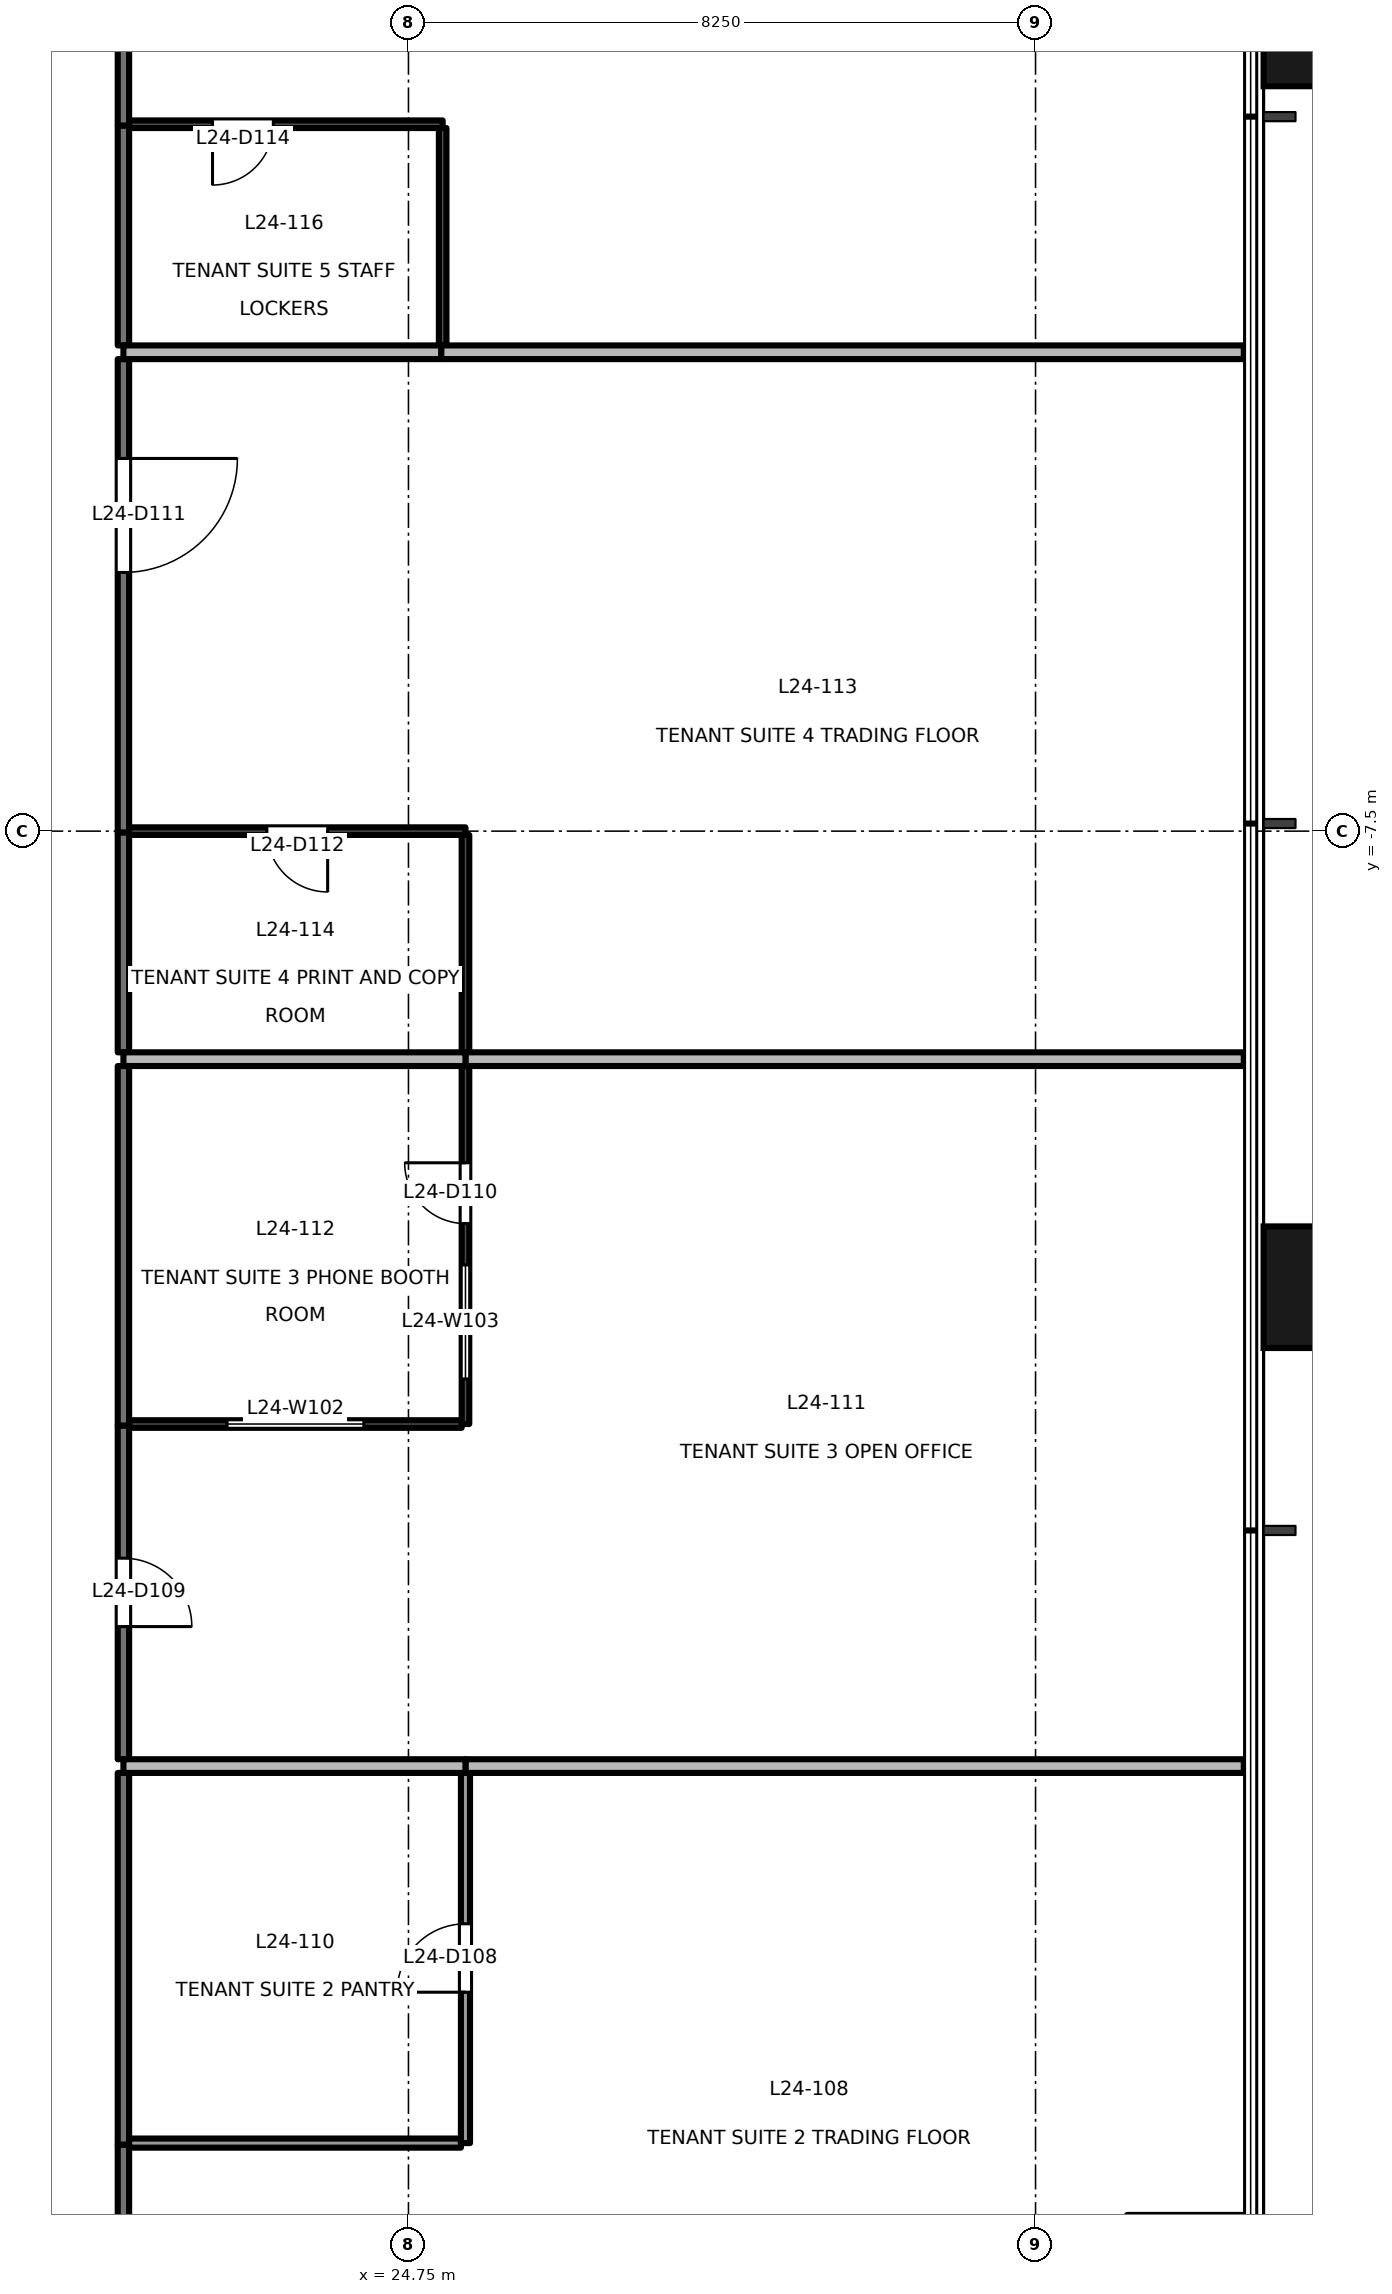
"""IFC4 building model, lengths in metres.
Left out: names, types, materials, properties, quantities, classifications, styles, units other than length and angle.
Written with IfcOpenShell. Run it as: python <this file> out.ifc"""

import sys

from ifc_helpers import new_model, si_unit, direction, frame, frame_2d, origin, origin_2d, place, context, subcontext, project, spatial, rectangle, extrude, element, fill, save


model = new_model("IFC4")
c1 = context("Model", 3, precision=1e-05, world=origin(), true_north=direction((0.0, 1.0)))
c2 = subcontext(c1, "Body", "Model", "MODEL_VIEW")
j1 = project(units=[si_unit("LENGTHUNIT", "METRE"), si_unit("PLANEANGLEUNIT", "RADIAN")], contexts=[c1])
p1 = place(None, origin())
s1 = spatial("IfcSite", under=j1, at=p1, CompositionType="ELEMENT")
p2 = place(p1, origin())
s2 = spatial("IfcBuilding", under=s1, at=p2, CompositionType="ELEMENT")
p3 = place(p2, frame((0.0, 0.0, 107.7)))
s3 = spatial("IfcBuildingStorey", under=s2, at=p3, CompositionType="ELEMENT", Elevation=107.7)
for number, where, z_axis, x_axis in (
    (1, (36.9, -13.5, -0.2), (0.0, 0.0, 1.0), (0.0, 1.0, 0.0)),
    (2, (36.9, 3.1, -0.2), (0.0, 0.0, 1.0), (0.0, 1.0, 0.0)),
):
    element("IfcColumn", number, at=place(p3, frame(where, z_axis=z_axis, x_axis=x_axis)), inside=s3, PredefinedType="COLUMN", context=c2, shape_type="SweptSolid", body=[
        extrude(rectangle(XDim=1.6, YDim=1.8, at=origin_2d()), origin(), (0.0, 0.0, 1.0), 4.0),
    ])
p4 = place(p3, frame((21.0, -24.78, 0.0), z_axis=(0.0, 0.0, 1.0), x_axis=(0.0, -1.0, 0.0)))
e3 = element("IfcWall", 3, at=p4, inside=s3, PredefinedType="PARTITIONING", context=c2, shape_type="SweptSolid", body=[
    extrude(rectangle(XDim=3.9, YDim=0.15, at=frame_2d((1.95, 0.0))), origin(), (0.0, 0.0, 1.0), 3.8),
])
p5 = place(p4, frame((1.675, 0.0, 0.0)))
e4 = element("IfcOpeningElement", 4, at=p5, cuts=e3, PredefinedType="OPENING", context=c2, shape_type="SweptSolid", body=[
    extrude(rectangle(XDim=1.5, YDim=2.1, at=frame_2d((0.75, 1.05))), frame((0.0, 0.085, 0.0), z_axis=(0.0, -1.0, 0.0), x_axis=(1.0, 0.0, 0.0)), (0.0, 0.0, 1.0), 0.171),
])
p6 = place(p3, frame((21.0, -19.89, 0.0), z_axis=(0.0, 0.0, 1.0), x_axis=(0.0, -1.0, 0.0)))
e5 = element("IfcWall", 5, at=p6, inside=s3, PredefinedType="PARTITIONING", context=c2, shape_type="SweptSolid", body=[
    extrude(rectangle(XDim=4.89, YDim=0.15, at=frame_2d((2.445, 0.0))), origin(), (0.0, 0.0, 1.0), 3.8),
])
p7 = place(p3, frame((21.0, -15.32, 0.0), z_axis=(0.0, 0.0, 1.0), x_axis=(0.0, -1.0, 0.0)))
e6 = element("IfcWall", 6, at=p7, inside=s3, PredefinedType="PARTITIONING", context=c2, shape_type="SweptSolid", body=[
    extrude(rectangle(XDim=4.39, YDim=0.15, at=frame_2d((2.195, 0.0))), origin(), (0.0, 0.0, 1.0), 3.8),
])
p8 = place(p7, frame((1.745, 0.0, 0.0)))
e7 = element("IfcOpeningElement", 7, at=p8, cuts=e6, PredefinedType="OPENING", context=c2, shape_type="SweptSolid", body=[
    extrude(rectangle(XDim=0.9, YDim=2.1, at=frame_2d((0.45, 1.05))), frame((0.0, 0.085, 0.0), z_axis=(0.0, -1.0, 0.0), x_axis=(1.0, 0.0, 0.0)), (0.0, 0.0, 1.0), 0.171),
])
p9 = place(p3, frame((21.0, -10.59, 0.0), z_axis=(0.0, 0.0, 1.0), x_axis=(0.0, -1.0, 0.0)))
e8 = element("IfcWall", 8, at=p9, inside=s3, PredefinedType="PARTITIONING", context=c2, shape_type="SweptSolid", body=[
    extrude(rectangle(XDim=4.73, YDim=0.15, at=frame_2d((2.365, 0.0))), origin(), (0.0, 0.0, 1.0), 2.9),
])
p10 = place(p3, frame((21.0, -1.29, 0.0), z_axis=(0.0, 0.0, 1.0), x_axis=(0.0, -1.0, 0.0)))
e9 = element("IfcWall", 9, at=p10, inside=s3, PredefinedType="PARTITIONING", context=c2, shape_type="SweptSolid", body=[
    extrude(rectangle(XDim=6.23, YDim=0.15, at=frame_2d((3.115, 0.0))), origin(), (0.0, 0.0, 1.0), 2.9),
])
p11 = place(p10, frame((1.307, 0.0, 0.0)))
e10 = element("IfcOpeningElement", 10, at=p11, cuts=e9, PredefinedType="OPENING", context=c2, shape_type="SweptSolid", body=[
    extrude(rectangle(XDim=1.5, YDim=2.1, at=frame_2d((0.75, 1.05))), frame((0.0, 0.085, 0.0), z_axis=(0.0, -1.0, 0.0), x_axis=(1.0, 0.0, 0.0)), (0.0, 0.0, 1.0), 0.171),
])
p12 = place(p3, frame((21.0, -7.52, 0.0), z_axis=(0.0, 0.0, 1.0), x_axis=(0.0, -1.0, 0.0)))
e11 = element("IfcWall", 11, at=p12, inside=s3, PredefinedType="PARTITIONING", context=c2, shape_type="SweptSolid", body=[
    extrude(rectangle(XDim=2.89, YDim=0.15, at=frame_2d((1.445, 0.0))), origin(), (0.0, 0.0, 1.0), 2.9),
])
p13 = place(p3, frame((21.0, 6.32, 0.0), z_axis=(0.0, 0.0, 1.0), x_axis=(0.0, -1.0, 0.0)))
e12 = element("IfcWall", 12, at=p13, inside=s3, PredefinedType="PARTITIONING", context=c2, shape_type="SweptSolid", body=[
    extrude(rectangle(XDim=4.54, YDim=0.15, at=frame_2d((2.27, 0.0))), origin(), (0.0, 0.0, 1.0), 2.9),
])
p14 = place(p13, frame((1.52, 0.0, 0.0)))
e13 = element("IfcOpeningElement", 13, at=p14, cuts=e12, PredefinedType="OPENING", context=c2, shape_type="SweptSolid", body=[
    extrude(rectangle(XDim=1.5, YDim=2.1, at=frame_2d((0.75, 1.05))), frame((0.0, 0.085, 0.0), z_axis=(0.0, -1.0, 0.0), x_axis=(1.0, 0.0, 0.0)), (0.0, 0.0, 1.0), 0.171),
])
p15 = place(p3, frame((21.0, 1.78, 0.0), z_axis=(0.0, 0.0, 1.0), x_axis=(0.0, -1.0, 0.0)))
e14 = element("IfcWall", 14, at=p15, inside=s3, PredefinedType="PARTITIONING", context=c2, shape_type="SweptSolid", body=[
    extrude(rectangle(XDim=2.89, YDim=0.15, at=frame_2d((1.445, 0.0))), origin(), (0.0, 0.0, 1.0), 2.9),
])
p16 = place(p3, frame((21.075, -24.76, 0.0), z_axis=(0.0, 0.0, 1.0), x_axis=(1.0, 0.0, 0.0)))
e15 = element("IfcWall", 15, at=p16, inside=s3, PredefinedType="PARTITIONING", context=c2, shape_type="SweptSolid", body=[
    extrude(rectangle(XDim=4.365, YDim=0.12, at=frame_2d((2.183, 0.0))), origin(), (0.0, 0.0, 1.0), 3.8),
])
p17 = place(p3, frame((25.5, -24.76, 0.0), z_axis=(0.0, 0.0, 1.0), x_axis=(0.0, 1.0, 0.0)))
e16 = element("IfcWall", 16, at=p17, inside=s3, PredefinedType="PARTITIONING", context=c2, shape_type="SweptSolid", body=[
    extrude(rectangle(XDim=4.87, YDim=0.12, at=frame_2d((2.435, 0.0))), origin(), (0.0, 0.0, 1.0), 3.8),
])
p18 = place(p17, frame((1.985, 0.0, 0.0)))
e17 = element("IfcOpeningElement", 17, at=p18, cuts=e16, PredefinedType="OPENING", context=c2, shape_type="SweptSolid", body=[
    extrude(rectangle(XDim=0.9, YDim=2.1, at=frame_2d((0.45, 1.05))), frame((0.0, 0.071, 0.0), z_axis=(0.0, -1.0, 0.0), x_axis=(1.0, 0.0, 0.0)), (0.0, 0.0, 1.0), 0.141),
])
p19 = place(p3, frame((25.5, -19.8, 0.0), z_axis=(0.0, 0.0, 1.0), x_axis=(1.0, 0.0, 0.0)))
e18 = element("IfcWall", 18, at=p19, inside=s3, PredefinedType="PARTITIONING", context=c2, shape_type="SweptSolid", body=[
    extrude(rectangle(XDim=10.24, YDim=0.18, at=frame_2d((5.12, 0.0))), origin(), (0.0, 0.0, 1.0), 3.8),
])
p20 = place(p3, frame((21.0, -19.8, 0.0), z_axis=(0.0, 0.0, 1.0), x_axis=(1.0, 0.0, 0.0)))
e19 = element("IfcWall", 19, at=p20, inside=s3, PredefinedType="PARTITIONING", context=c2, shape_type="SweptSolid", body=[
    extrude(rectangle(XDim=4.5, YDim=0.18, at=frame_2d((2.25, 0.0))), origin(), (0.0, 0.0, 1.0), 3.8),
])
p21 = place(p3, frame((21.075, -15.3, 0.0), z_axis=(0.0, 0.0, 1.0), x_axis=(1.0, 0.0, 0.0)))
e20 = element("IfcWall", 20, at=p21, inside=s3, PredefinedType="PARTITIONING", context=c2, shape_type="SweptSolid", body=[
    extrude(rectangle(XDim=4.375, YDim=0.1, at=frame_2d((2.188, 0.0))), origin(), (0.0, 0.0, 1.0), 3.8),
])
p22 = place(p21, frame((1.288, 0.0, 0.9)))
e21 = element("IfcOpeningElement", 21, at=p22, cuts=e20, PredefinedType="OPENING", context=c2, shape_type="SweptSolid", body=[
    extrude(rectangle(XDim=1.8, YDim=1.2, at=frame_2d((0.9, 0.6))), frame((0.0, 0.061, 0.0), z_axis=(0.0, -1.0, 0.0), x_axis=(1.0, 0.0, 0.0)), (0.0, 0.0, 1.0), 0.121),
])
p23 = place(p3, frame((25.5, -15.3, 0.0), z_axis=(0.0, 0.0, 1.0), x_axis=(0.0, 1.0, 0.0)))
e22 = element("IfcWall", 22, at=p23, inside=s3, PredefinedType="PARTITIONING", context=c2, shape_type="SweptSolid", body=[
    extrude(rectangle(XDim=4.71, YDim=0.1, at=frame_2d((2.355, 0.0))), origin(), (0.0, 0.0, 1.0), 2.9),
])
p24 = place(p23, frame((2.637, 0.0, 0.0)))
e23 = element("IfcOpeningElement", 23, at=p24, cuts=e22, PredefinedType="OPENING", context=c2, shape_type="SweptSolid", body=[
    extrude(rectangle(XDim=0.8, YDim=2.1, at=frame_2d((0.4, 1.05))), frame((0.0, 0.061, 0.0), z_axis=(0.0, -1.0, 0.0), x_axis=(1.0, 0.0, 0.0)), (0.0, 0.0, 1.0), 0.121),
])
p25 = place(p23, frame((0.593, 0.0, 0.9)))
e24 = element("IfcOpeningElement", 24, at=p25, cuts=e22, PredefinedType="OPENING", context=c2, shape_type="SweptSolid", body=[
    extrude(rectangle(XDim=1.5, YDim=1.2, at=frame_2d((0.75, 0.6))), frame((0.0, 0.061, 0.0), z_axis=(0.0, -1.0, 0.0), x_axis=(1.0, 0.0, 0.0)), (0.0, 0.0, 1.0), 0.121),
])
p26 = place(p3, frame((25.5, -10.5, 0.0), z_axis=(0.0, 0.0, 1.0), x_axis=(1.0, 0.0, 0.0)))
e25 = element("IfcWall", 25, at=p26, inside=s3, PredefinedType="PARTITIONING", context=c2, shape_type="SweptSolid", body=[
    extrude(rectangle(XDim=10.24, YDim=0.18, at=frame_2d((5.12, 0.0))), origin(), (0.0, 0.0, 1.0), 3.8),
])
p27 = place(p3, frame((21.0, -10.5, 0.0), z_axis=(0.0, 0.0, 1.0), x_axis=(1.0, 0.0, 0.0)))
e26 = element("IfcWall", 26, at=p27, inside=s3, PredefinedType="PARTITIONING", context=c2, shape_type="SweptSolid", body=[
    extrude(rectangle(XDim=4.5, YDim=0.18, at=frame_2d((2.25, 0.0))), origin(), (0.0, 0.0, 1.0), 3.8),
])
p28 = place(p3, frame((25.5, -7.5, 0.0), z_axis=(0.0, 0.0, 1.0), x_axis=(-1.0, 0.0, 0.0)))
e27 = element("IfcWall", 27, at=p28, inside=s3, PredefinedType="PARTITIONING", context=c2, shape_type="SweptSolid", body=[
    extrude(rectangle(XDim=4.425, YDim=0.1, at=frame_2d((2.212, 0.0))), origin(), (0.0, 0.0, 1.0), 3.8),
])
p29 = place(p28, frame((1.813, 0.0, 0.0)))
e28 = element("IfcOpeningElement", 28, at=p29, cuts=e27, PredefinedType="OPENING", context=c2, shape_type="SweptSolid", body=[
    extrude(rectangle(XDim=0.8, YDim=2.1, at=frame_2d((0.4, 1.05))), frame((0.0, 0.061, 0.0), z_axis=(0.0, -1.0, 0.0), x_axis=(1.0, 0.0, 0.0)), (0.0, 0.0, 1.0), 0.121),
])
p30 = place(p3, frame((25.5, -10.41, 0.0), z_axis=(0.0, 0.0, 1.0), x_axis=(0.0, 1.0, 0.0)))
e29 = element("IfcWall", 29, at=p30, inside=s3, PredefinedType="PARTITIONING", context=c2, shape_type="SweptSolid", body=[
    extrude(rectangle(XDim=2.86, YDim=0.1, at=frame_2d((1.43, 0.0))), origin(), (0.0, 0.0, 1.0), 2.9),
])
p31 = place(p3, frame((25.18, -1.2, 0.0), z_axis=(0.0, 0.0, 1.0), x_axis=(1.0, 0.0, 0.0)))
e30 = element("IfcWall", 30, at=p31, inside=s3, PredefinedType="PARTITIONING", context=c2, shape_type="SweptSolid", body=[
    extrude(rectangle(XDim=10.56, YDim=0.18, at=frame_2d((5.28, 0.0))), origin(), (0.0, 0.0, 1.0), 3.8),
])
p32 = place(p3, frame((21.0, -1.2, 0.0), z_axis=(0.0, 0.0, 1.0), x_axis=(1.0, 0.0, 0.0)))
e31 = element("IfcWall", 31, at=p32, inside=s3, PredefinedType="PARTITIONING", context=c2, shape_type="SweptSolid", body=[
    extrude(rectangle(XDim=4.18, YDim=0.18, at=frame_2d((2.09, 0.0))), origin(), (0.0, 0.0, 1.0), 3.8),
])
p33 = place(p3, frame((25.2, 1.8, 0.0), z_axis=(0.0, 0.0, 1.0), x_axis=(-1.0, 0.0, 0.0)))
e32 = element("IfcWall", 32, at=p33, inside=s3, PredefinedType="PARTITIONING", context=c2, shape_type="SweptSolid", body=[
    extrude(rectangle(XDim=4.125, YDim=0.1, at=frame_2d((2.062, 0.0))), origin(), (0.0, 0.0, 1.0), 3.8),
])
p34 = place(p33, frame((2.228, 0.0, 0.0)))
e33 = element("IfcOpeningElement", 33, at=p34, cuts=e32, PredefinedType="OPENING", context=c2, shape_type="SweptSolid", body=[
    extrude(rectangle(XDim=0.8, YDim=2.1, at=frame_2d((0.4, 1.05))), frame((0.0, 0.061, 0.0), z_axis=(0.0, -1.0, 0.0), x_axis=(1.0, 0.0, 0.0)), (0.0, 0.0, 1.0), 0.121),
])
p35 = place(p3, frame((25.2, -1.11, 0.0), z_axis=(0.0, 0.0, 1.0), x_axis=(0.0, 1.0, 0.0)))
e34 = element("IfcWall", 34, at=p35, inside=s3, PredefinedType="PARTITIONING", context=c2, shape_type="SweptSolid", body=[
    extrude(rectangle(XDim=2.86, YDim=0.1, at=frame_2d((1.43, 0.0))), origin(), (0.0, 0.0, 1.0), 2.9),
])
p36 = place(p18, origin())
e35 = element("IfcDoor", 35, at=p36, inside=s3, OperationType="SINGLE_SWING_LEFT", PredefinedType="DOOR", context=c2, shape_type="SweptSolid", body=[
    extrude(rectangle(XDim=0.9, YDim=2.1, at=frame_2d((0.45, 1.05))), frame((0.0, 0.025, 0.0), z_axis=(0.0, -1.0, 0.0), x_axis=(1.0, 0.0, 0.0)), (0.0, 0.0, 1.0), 0.05),
])
fill(e17, e35)
p37 = place(p8, origin())
e36 = element("IfcDoor", 36, at=p37, inside=s3, OperationType="SINGLE_SWING_RIGHT", PredefinedType="DOOR", context=c2, shape_type="SweptSolid", body=[
    extrude(rectangle(XDim=0.9, YDim=2.1, at=frame_2d((0.45, 1.05))), frame((0.0, 0.025, 0.0), z_axis=(0.0, -1.0, 0.0), x_axis=(1.0, 0.0, 0.0)), (0.0, 0.0, 1.0), 0.05),
])
fill(e7, e36)
p38 = place(p24, origin())
e37 = element("IfcDoor", 37, at=p38, inside=s3, OperationType="SINGLE_SWING_RIGHT", PredefinedType="DOOR", context=c2, shape_type="SweptSolid", body=[
    extrude(rectangle(XDim=0.8, YDim=2.1, at=frame_2d((0.4, 1.05))), frame((0.0, 0.025, 0.0), z_axis=(0.0, -1.0, 0.0), x_axis=(1.0, 0.0, 0.0)), (0.0, 0.0, 1.0), 0.05),
])
fill(e23, e37)
p39 = place(p11, origin())
e38 = element("IfcDoor", 38, at=p39, inside=s3, OperationType="DOUBLE_DOOR_SINGLE_SWING", PredefinedType="DOOR", context=c2, shape_type="SweptSolid", body=[
    extrude(rectangle(XDim=1.5, YDim=2.1, at=frame_2d((0.75, 1.05))), frame((0.0, 0.025, 0.0), z_axis=(0.0, -1.0, 0.0), x_axis=(1.0, 0.0, 0.0)), (0.0, 0.0, 1.0), 0.05),
])
fill(e10, e38)
p40 = place(p29, origin())
e39 = element("IfcDoor", 39, at=p40, inside=s3, OperationType="SINGLE_SWING_LEFT", PredefinedType="DOOR", context=c2, shape_type="SweptSolid", body=[
    extrude(rectangle(XDim=0.8, YDim=2.1, at=frame_2d((0.4, 1.05))), frame((0.0, 0.025, 0.0), z_axis=(0.0, -1.0, 0.0), x_axis=(1.0, 0.0, 0.0)), (0.0, 0.0, 1.0), 0.05),
])
fill(e28, e39)
p41 = place(p34, origin())
e40 = element("IfcDoor", 40, at=p41, inside=s3, OperationType="SINGLE_SWING_RIGHT", PredefinedType="DOOR", context=c2, shape_type="SweptSolid", body=[
    extrude(rectangle(XDim=0.8, YDim=2.1, at=frame_2d((0.4, 1.05))), frame((0.0, 0.025, 0.0), z_axis=(0.0, -1.0, 0.0), x_axis=(1.0, 0.0, 0.0)), (0.0, 0.0, 1.0), 0.05),
])
fill(e33, e40)
p42 = place(p22, origin())
e41 = element("IfcWindow", 41, at=p42, inside=s3, PartitioningType="SINGLE_PANEL", PredefinedType="WINDOW", context=c2, shape_type="SweptSolid", body=[
    extrude(rectangle(XDim=1.8, YDim=1.2, at=frame_2d((0.9, 0.6))), frame((0.0, 0.03, 0.0), z_axis=(0.0, -1.0, 0.0), x_axis=(1.0, 0.0, 0.0)), (0.0, 0.0, 1.0), 0.06),
])
fill(e21, e41)
p43 = place(p25, origin())
e42 = element("IfcWindow", 42, at=p43, inside=s3, PartitioningType="SINGLE_PANEL", PredefinedType="WINDOW", context=c2, shape_type="SweptSolid", body=[
    extrude(rectangle(XDim=1.5, YDim=1.2, at=frame_2d((0.75, 0.6))), frame((0.0, 0.03, 0.0), z_axis=(0.0, -1.0, 0.0), x_axis=(1.0, 0.0, 0.0)), (0.0, 0.0, 1.0), 0.06),
])
fill(e24, e42)
save(model, sys.argv[1])
